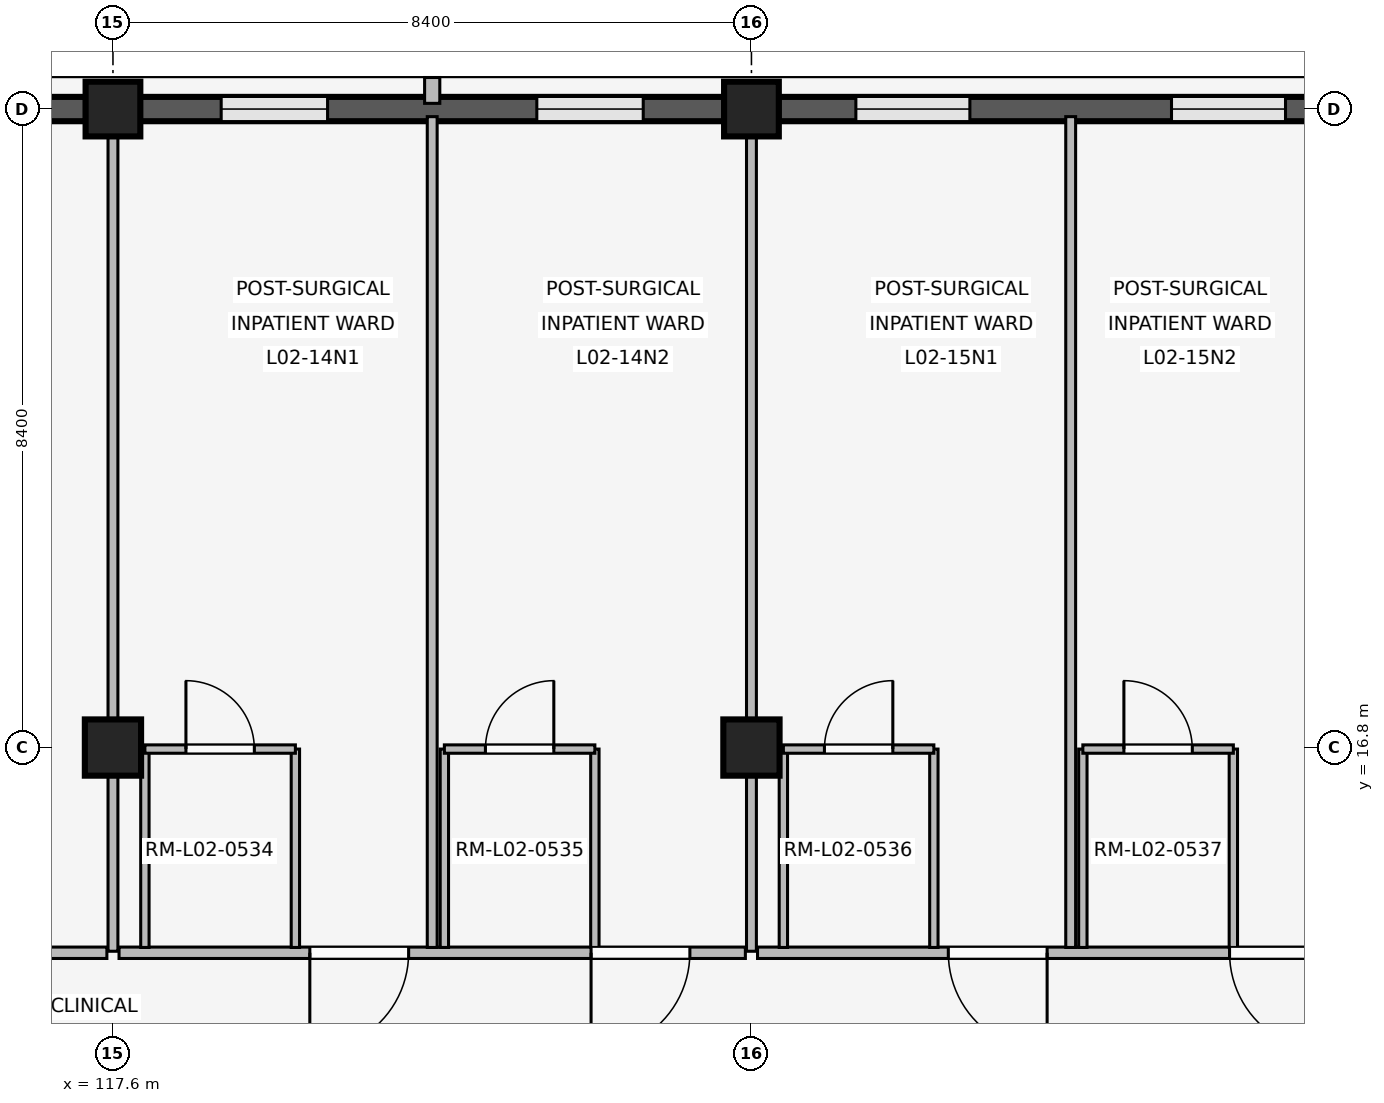
"""IFC4 building model, lengths in metres.
Left out: names, types, materials, properties, quantities, classifications, styles, units other than length and angle.
Written with IfcOpenShell. Run it as: python <this file> out.ifc"""

import sys

from ifc_helpers import new_model, si_unit, direction, frame, frame_2d, origin, origin_2d, place, context, subcontext, project, spatial, rectangle, extrude, element, fill, save


model = new_model("IFC4")
c1 = context("Model", 3, precision=1e-05, world=origin(), true_north=direction((0.0, 1.0)))
c2 = subcontext(c1, "Body", "Model", "MODEL_VIEW")
j1 = project(units=[si_unit("LENGTHUNIT", "METRE"), si_unit("PLANEANGLEUNIT", "RADIAN")], contexts=[c1])
p1 = place(None, origin())
s1 = spatial("IfcSite", under=j1, at=p1, CompositionType="ELEMENT")
p2 = place(p1, origin())
s2 = spatial("IfcBuilding", under=s1, at=p2, CompositionType="ELEMENT")
p3 = place(p2, frame((0.0, 0.0, 8.1)))
s3 = spatial("IfcBuildingStorey", under=s2, at=p3, CompositionType="ELEMENT", Elevation=8.1)
p4 = place(p3, frame((117.6, 16.8, 0.0), z_axis=(0.0, 0.0, 1.0), x_axis=(1.0, 0.0, 0.0)))
e1 = element("IfcColumn", 1, at=p4, inside=s3, PredefinedType="COLUMN", context=c2, shape_type="SweptSolid", body=[
    extrude(rectangle(XDim=0.74, YDim=0.74, at=origin_2d()), origin(), (0.0, 0.0, 1.0), 4.8),
])
p5 = place(p3, frame((117.6, 25.2, 0.0), z_axis=(0.0, 0.0, 1.0), x_axis=(1.0, 0.0, 0.0)))
e2 = element("IfcColumn", 2, at=p5, inside=s3, PredefinedType="COLUMN", context=c2, shape_type="SweptSolid", body=[
    extrude(rectangle(XDim=0.72, YDim=0.72, at=origin_2d()), origin(), (0.0, 0.0, 1.0), 4.8),
])
p6 = place(p3, frame((126.0, 16.8, 0.0), z_axis=(0.0, 0.0, 1.0), x_axis=(1.0, 0.0, 0.0)))
e3 = element("IfcColumn", 3, at=p6, inside=s3, PredefinedType="COLUMN", context=c2, shape_type="SweptSolid", body=[
    extrude(rectangle(XDim=0.74, YDim=0.74, at=origin_2d()), origin(), (0.0, 0.0, 1.0), 4.8),
])
p7 = place(p3, frame((126.0, 25.2, 0.0), z_axis=(0.0, 0.0, 1.0), x_axis=(1.0, 0.0, 0.0)))
e4 = element("IfcColumn", 4, at=p7, inside=s3, PredefinedType="COLUMN", context=c2, shape_type="SweptSolid", body=[
    extrude(rectangle(XDim=0.72, YDim=0.72, at=origin_2d()), origin(), (0.0, 0.0, 1.0), 4.8),
])
p8 = place(p3, frame((109.555, 25.2, 0.0), z_axis=(0.0, 0.0, 1.0), x_axis=(1.0, 0.0, 0.0)))
e5 = element("IfcWall", 5, at=p8, inside=s3, PredefinedType="SOLIDWALL", context=c2, shape_type="SweptSolid", body=[
    extrude(rectangle(XDim=7.69, YDim=0.32, at=frame_2d((3.845, 0.0))), origin(), (0.0, 0.0, 1.0), 3.86),
])
p9 = place(p8, frame((1.189, 0.0, 0.85)))
e6 = element("IfcOpeningElement", 6, at=p9, cuts=e5, PredefinedType="OPENING", context=c2, shape_type="SweptSolid", body=[
    extrude(rectangle(XDim=1.16, YDim=1.48, at=frame_2d((0.58, 0.74))), frame((0.0, 0.17, 0.0), z_axis=(0.0, -1.0, 0.0), x_axis=(1.0, 0.0, 0.0)), (0.0, 0.0, 1.0), 0.34),
])
p10 = place(p8, frame((5.341, 0.0, 0.85)))
e7 = element("IfcOpeningElement", 7, at=p10, cuts=e5, PredefinedType="OPENING", context=c2, shape_type="SweptSolid", body=[
    extrude(rectangle(XDim=1.16, YDim=1.48, at=frame_2d((0.58, 0.74))), frame((0.0, 0.17, 0.0), z_axis=(0.0, -1.0, 0.0), x_axis=(1.0, 0.0, 0.0)), (0.0, 0.0, 1.0), 0.34),
])
p11 = place(p3, frame((117.955, 25.2, 0.0), z_axis=(0.0, 0.0, 1.0), x_axis=(1.0, 0.0, 0.0)))
e8 = element("IfcWall", 8, at=p11, inside=s3, PredefinedType="SOLIDWALL", context=c2, shape_type="SweptSolid", body=[
    extrude(rectangle(XDim=7.69, YDim=0.32, at=frame_2d((3.845, 0.0))), origin(), (0.0, 0.0, 1.0), 3.86),
])
p12 = place(p11, frame((1.069, 0.0, 0.85)))
e9 = element("IfcOpeningElement", 9, at=p12, cuts=e8, PredefinedType="OPENING", context=c2, shape_type="SweptSolid", body=[
    extrude(rectangle(XDim=1.4, YDim=1.4, at=frame_2d((0.7, 0.7))), frame((0.0, 0.17, 0.0), z_axis=(0.0, -1.0, 0.0), x_axis=(1.0, 0.0, 0.0)), (0.0, 0.0, 1.0), 0.34),
])
p13 = place(p11, frame((5.221, 0.0, 0.85)))
e10 = element("IfcOpeningElement", 10, at=p13, cuts=e8, PredefinedType="OPENING", context=c2, shape_type="SweptSolid", body=[
    extrude(rectangle(XDim=1.4, YDim=1.4, at=frame_2d((0.7, 0.7))), frame((0.0, 0.17, 0.0), z_axis=(0.0, -1.0, 0.0), x_axis=(1.0, 0.0, 0.0)), (0.0, 0.0, 1.0), 0.34),
])
p14 = place(p3, frame((121.8, 25.275, 0.0), z_axis=(0.0, 0.0, 1.0), x_axis=(0.0, 1.0, 0.0)))
e11 = element("IfcWall", 11, at=p14, inside=s3, PredefinedType="ELEMENTEDWALL", context=c2, shape_type="SweptSolid", body=[
    extrude(rectangle(XDim=0.34, YDim=0.2, at=frame_2d((0.17, 0.0))), origin(), (0.0, 0.0, 1.0), 3.84),
])
p15 = place(p3, frame((126.355, 25.2, 0.0), z_axis=(0.0, 0.0, 1.0), x_axis=(1.0, 0.0, 0.0)))
e12 = element("IfcWall", 12, at=p15, inside=s3, PredefinedType="SOLIDWALL", context=c2, shape_type="SweptSolid", body=[
    extrude(rectangle(XDim=7.69, YDim=0.32, at=frame_2d((3.845, 0.0))), origin(), (0.0, 0.0, 1.0), 3.86),
])
p16 = place(p15, frame((1.019, 0.0, 0.85)))
e13 = element("IfcOpeningElement", 13, at=p16, cuts=e12, PredefinedType="OPENING", context=c2, shape_type="SweptSolid", body=[
    extrude(rectangle(XDim=1.5, YDim=1.55, at=frame_2d((0.75, 0.775))), frame((0.0, 0.17, 0.0), z_axis=(0.0, -1.0, 0.0), x_axis=(1.0, 0.0, 0.0)), (0.0, 0.0, 1.0), 0.34),
])
p17 = place(p15, frame((5.171, 0.0, 0.85)))
e14 = element("IfcOpeningElement", 14, at=p17, cuts=e12, PredefinedType="OPENING", context=c2, shape_type="SweptSolid", body=[
    extrude(rectangle(XDim=1.5, YDim=1.55, at=frame_2d((0.75, 0.775))), frame((0.0, 0.17, 0.0), z_axis=(0.0, -1.0, 0.0), x_axis=(1.0, 0.0, 0.0)), (0.0, 0.0, 1.0), 0.34),
])
p18 = place(p3, frame((117.52, 14.1, 0.0), z_axis=(0.0, 0.0, 1.0), x_axis=(-1.0, 0.0, 0.0)))
e15 = element("IfcWall", 15, at=p18, inside=s3, PredefinedType="PARTITIONING", context=c2, shape_type="SweptSolid", body=[
    extrude(rectangle(XDim=8.24, YDim=0.15, at=frame_2d((4.12, 0.0))), origin(), (0.0, 0.0, 1.0), 3.84),
])
p19 = place(p18, frame((3.37, 0.0, 0.0)))
e16 = element("IfcOpeningElement", 16, at=p19, cuts=e15, PredefinedType="OPENING", context=c2, shape_type="SweptSolid", body=[
    extrude(rectangle(XDim=1.5, YDim=2.3, at=frame_2d((0.75, 1.15))), frame((0.0, 0.085, 0.0), z_axis=(0.0, -1.0, 0.0), x_axis=(1.0, 0.0, 0.0)), (0.0, 0.0, 1.0), 0.17),
])
p20 = place(p3, frame((117.6, 14.12, 0.0), z_axis=(0.0, 0.0, 1.0), x_axis=(0.0, 1.0, 0.0)))
e17 = element("IfcWall", 17, at=p20, inside=s3, PredefinedType="PARTITIONING", context=c2, shape_type="SweptSolid", body=[
    extrude(rectangle(XDim=10.94, YDim=0.13, at=frame_2d((5.47, 0.0))), origin(), (0.0, 0.0, 1.0), 3.84),
])
p21 = place(p3, frame((125.92, 14.1, 0.0), z_axis=(0.0, 0.0, 1.0), x_axis=(-1.0, 0.0, 0.0)))
e18 = element("IfcWall", 18, at=p21, inside=s3, PredefinedType="PARTITIONING", context=c2, shape_type="SweptSolid", body=[
    extrude(rectangle(XDim=8.24, YDim=0.15, at=frame_2d((4.12, 0.0))), origin(), (0.0, 0.0, 1.0), 3.84),
])
p22 = place(p21, frame((0.73, 0.0, 0.0)))
e19 = element("IfcOpeningElement", 19, at=p22, cuts=e18, PredefinedType="OPENING", context=c2, shape_type="SweptSolid", body=[
    extrude(rectangle(XDim=1.3, YDim=2.25, at=frame_2d((0.65, 1.125))), frame((0.0, 0.085, 0.0), z_axis=(0.0, -1.0, 0.0), x_axis=(1.0, 0.0, 0.0)), (0.0, 0.0, 1.0), 0.17),
])
p23 = place(p21, frame((4.43, 0.0, 0.0)))
e20 = element("IfcOpeningElement", 20, at=p23, cuts=e18, PredefinedType="OPENING", context=c2, shape_type="SweptSolid", body=[
    extrude(rectangle(XDim=1.3, YDim=2.25, at=frame_2d((0.65, 1.125))), frame((0.0, 0.085, 0.0), z_axis=(0.0, -1.0, 0.0), x_axis=(1.0, 0.0, 0.0)), (0.0, 0.0, 1.0), 0.17),
])
p24 = place(p3, frame((121.8, 14.17, 0.0), z_axis=(0.0, 0.0, 1.0), x_axis=(0.0, 1.0, 0.0)))
e21 = element("IfcWall", 21, at=p24, inside=s3, PredefinedType="PARTITIONING", context=c2, shape_type="SweptSolid", body=[
    extrude(rectangle(XDim=10.93, YDim=0.13, at=frame_2d((5.465, 0.0))), origin(), (0.0, 0.0, 1.0), 3.84),
])
for number, where, z_axis, x_axis in (
    (22, (118.02, 14.17, 0.0), (0.0, 0.0, 1.0), (0.0, 1.0, 0.0)),
    (23, (120.0, 14.17, 0.0), (0.0, 0.0, 1.0), (0.0, 1.0, 0.0)),
):
    element("IfcWall", number, at=place(p3, frame(where, z_axis=z_axis, x_axis=x_axis)), inside=s3, PredefinedType="PARTITIONING", context=c2, shape_type="SweptSolid", body=[
        extrude(rectangle(XDim=2.61, YDim=0.11, at=frame_2d((1.305, 0.0))), origin(), (0.0, 0.0, 1.0), 3.84),
    ])
p25 = place(p3, frame((118.02, 16.78, 0.0), z_axis=(0.0, 0.0, 1.0), x_axis=(1.0, 0.0, 0.0)))
e24 = element("IfcWall", 24, at=p25, inside=s3, PredefinedType="PARTITIONING", context=c2, shape_type="SweptSolid", body=[
    extrude(rectangle(XDim=1.98, YDim=0.11, at=frame_2d((0.99, 0.0))), origin(), (0.0, 0.0, 1.0), 3.84),
])
p26 = place(p25, frame((0.54, 0.0, 0.0)))
e25 = element("IfcOpeningElement", 25, at=p26, cuts=e24, PredefinedType="OPENING", context=c2, shape_type="SweptSolid", body=[
    extrude(rectangle(XDim=0.9, YDim=2.1, at=frame_2d((0.45, 1.05))), frame((0.0, 0.065, 0.0), z_axis=(0.0, -1.0, 0.0), x_axis=(1.0, 0.0, 0.0)), (0.0, 0.0, 1.0), 0.13),
])
for number, where, z_axis, x_axis in (
    (26, (121.96, 14.17, 0.0), (0.0, 0.0, 1.0), (0.0, 1.0, 0.0)),
    (27, (123.94, 14.17, 0.0), (0.0, 0.0, 1.0), (0.0, 1.0, 0.0)),
):
    element("IfcWall", number, at=place(p3, frame(where, z_axis=z_axis, x_axis=x_axis)), inside=s3, PredefinedType="PARTITIONING", context=c2, shape_type="SweptSolid", body=[
        extrude(rectangle(XDim=2.61, YDim=0.11, at=frame_2d((1.305, 0.0))), origin(), (0.0, 0.0, 1.0), 3.84),
    ])
p27 = place(p3, frame((121.96, 16.78, 0.0), z_axis=(0.0, 0.0, 1.0), x_axis=(1.0, 0.0, 0.0)))
e28 = element("IfcWall", 28, at=p27, inside=s3, PredefinedType="PARTITIONING", context=c2, shape_type="SweptSolid", body=[
    extrude(rectangle(XDim=1.98, YDim=0.11, at=frame_2d((0.99, 0.0))), origin(), (0.0, 0.0, 1.0), 3.84),
])
p28 = place(p27, frame((0.54, 0.0, 0.0)))
e29 = element("IfcOpeningElement", 29, at=p28, cuts=e28, PredefinedType="OPENING", context=c2, shape_type="SweptSolid", body=[
    extrude(rectangle(XDim=0.9, YDim=2.1, at=frame_2d((0.45, 1.05))), frame((0.0, 0.065, 0.0), z_axis=(0.0, -1.0, 0.0), x_axis=(1.0, 0.0, 0.0)), (0.0, 0.0, 1.0), 0.13),
])
p29 = place(p3, frame((126.0, 14.12, 0.0), z_axis=(0.0, 0.0, 1.0), x_axis=(0.0, 1.0, 0.0)))
e30 = element("IfcWall", 30, at=p29, inside=s3, PredefinedType="PARTITIONING", context=c2, shape_type="SweptSolid", body=[
    extrude(rectangle(XDim=10.94, YDim=0.13, at=frame_2d((5.47, 0.0))), origin(), (0.0, 0.0, 1.0), 3.84),
])
p30 = place(p3, frame((134.26, 14.1, 0.0), z_axis=(0.0, 0.0, 1.0), x_axis=(-1.0, 0.0, 0.0)))
e31 = element("IfcWall", 31, at=p30, inside=s3, PredefinedType="PARTITIONING", context=c2, shape_type="SweptSolid", body=[
    extrude(rectangle(XDim=8.18, YDim=0.15, at=frame_2d((4.09, 0.0))), origin(), (0.0, 0.0, 1.0), 3.84),
])
p31 = place(p30, frame((0.67, 0.0, 0.0)))
e32 = element("IfcOpeningElement", 32, at=p31, cuts=e31, PredefinedType="OPENING", context=c2, shape_type="SweptSolid", body=[
    extrude(rectangle(XDim=1.3, YDim=2.25, at=frame_2d((0.65, 1.125))), frame((0.0, 0.085, 0.0), z_axis=(0.0, -1.0, 0.0), x_axis=(1.0, 0.0, 0.0)), (0.0, 0.0, 1.0), 0.17),
])
p32 = place(p30, frame((4.37, 0.0, 0.0)))
e33 = element("IfcOpeningElement", 33, at=p32, cuts=e31, PredefinedType="OPENING", context=c2, shape_type="SweptSolid", body=[
    extrude(rectangle(XDim=1.3, YDim=2.25, at=frame_2d((0.65, 1.125))), frame((0.0, 0.085, 0.0), z_axis=(0.0, -1.0, 0.0), x_axis=(1.0, 0.0, 0.0)), (0.0, 0.0, 1.0), 0.17),
])
p33 = place(p3, frame((130.2, 14.17, 0.0), z_axis=(0.0, 0.0, 1.0), x_axis=(0.0, 1.0, 0.0)))
e34 = element("IfcWall", 34, at=p33, inside=s3, PredefinedType="PARTITIONING", context=c2, shape_type="SweptSolid", body=[
    extrude(rectangle(XDim=10.93, YDim=0.13, at=frame_2d((5.465, 0.0))), origin(), (0.0, 0.0, 1.0), 3.84),
])
for number, where, z_axis, x_axis in (
    (35, (126.42, 14.17, 0.0), (0.0, 0.0, 1.0), (0.0, 1.0, 0.0)),
    (36, (128.4, 14.17, 0.0), (0.0, 0.0, 1.0), (0.0, 1.0, 0.0)),
):
    element("IfcWall", number, at=place(p3, frame(where, z_axis=z_axis, x_axis=x_axis)), inside=s3, PredefinedType="PARTITIONING", context=c2, shape_type="SweptSolid", body=[
        extrude(rectangle(XDim=2.61, YDim=0.11, at=frame_2d((1.305, 0.0))), origin(), (0.0, 0.0, 1.0), 3.84),
    ])
p34 = place(p3, frame((126.42, 16.78, 0.0), z_axis=(0.0, 0.0, 1.0), x_axis=(1.0, 0.0, 0.0)))
e37 = element("IfcWall", 37, at=p34, inside=s3, PredefinedType="PARTITIONING", context=c2, shape_type="SweptSolid", body=[
    extrude(rectangle(XDim=1.98, YDim=0.11, at=frame_2d((0.99, 0.0))), origin(), (0.0, 0.0, 1.0), 3.84),
])
p35 = place(p34, frame((0.54, 0.0, 0.0)))
e38 = element("IfcOpeningElement", 38, at=p35, cuts=e37, PredefinedType="OPENING", context=c2, shape_type="SweptSolid", body=[
    extrude(rectangle(XDim=0.9, YDim=2.1, at=frame_2d((0.45, 1.05))), frame((0.0, 0.065, 0.0), z_axis=(0.0, -1.0, 0.0), x_axis=(1.0, 0.0, 0.0)), (0.0, 0.0, 1.0), 0.13),
])
for number, where, z_axis, x_axis in (
    (39, (130.36, 14.17, 0.0), (0.0, 0.0, 1.0), (0.0, 1.0, 0.0)),
    (40, (132.34, 14.17, 0.0), (0.0, 0.0, 1.0), (0.0, 1.0, 0.0)),
):
    element("IfcWall", number, at=place(p3, frame(where, z_axis=z_axis, x_axis=x_axis)), inside=s3, PredefinedType="PARTITIONING", context=c2, shape_type="SweptSolid", body=[
        extrude(rectangle(XDim=2.61, YDim=0.11, at=frame_2d((1.305, 0.0))), origin(), (0.0, 0.0, 1.0), 3.84),
    ])
p36 = place(p3, frame((130.36, 16.78, 0.0), z_axis=(0.0, 0.0, 1.0), x_axis=(1.0, 0.0, 0.0)))
e41 = element("IfcWall", 41, at=p36, inside=s3, PredefinedType="PARTITIONING", context=c2, shape_type="SweptSolid", body=[
    extrude(rectangle(XDim=1.98, YDim=0.11, at=frame_2d((0.99, 0.0))), origin(), (0.0, 0.0, 1.0), 3.84),
])
p37 = place(p36, frame((0.54, 0.0, 0.0)))
e42 = element("IfcOpeningElement", 42, at=p37, cuts=e41, PredefinedType="OPENING", context=c2, shape_type="SweptSolid", body=[
    extrude(rectangle(XDim=0.9, YDim=2.1, at=frame_2d((0.45, 1.05))), frame((0.0, 0.065, 0.0), z_axis=(0.0, -1.0, 0.0), x_axis=(1.0, 0.0, 0.0)), (0.0, 0.0, 1.0), 0.13),
])
p38 = place(p12, origin())
e43 = element("IfcWindow", 43, at=p38, inside=s3, PartitioningType="SINGLE_PANEL", PredefinedType="WINDOW", context=c2, shape_type="SweptSolid", body=[
    extrude(rectangle(XDim=1.4, YDim=1.4, at=frame_2d((0.7, 0.7))), frame((0.0, 0.03, 0.0), z_axis=(0.0, -1.0, 0.0), x_axis=(1.0, 0.0, 0.0)), (0.0, 0.0, 1.0), 0.06),
])
fill(e9, e43)
p39 = place(p13, origin())
e44 = element("IfcWindow", 44, at=p39, inside=s3, PartitioningType="SINGLE_PANEL", PredefinedType="WINDOW", context=c2, shape_type="SweptSolid", body=[
    extrude(rectangle(XDim=1.4, YDim=1.4, at=frame_2d((0.7, 0.7))), frame((0.0, 0.03, 0.0), z_axis=(0.0, -1.0, 0.0), x_axis=(1.0, 0.0, 0.0)), (0.0, 0.0, 1.0), 0.06),
])
fill(e10, e44)
p40 = place(p16, origin())
e45 = element("IfcWindow", 45, at=p40, inside=s3, PartitioningType="SINGLE_PANEL", PredefinedType="WINDOW", context=c2, shape_type="SweptSolid", body=[
    extrude(rectangle(XDim=1.5, YDim=1.55, at=frame_2d((0.75, 0.775))), frame((0.0, 0.03, 0.0), z_axis=(0.0, -1.0, 0.0), x_axis=(1.0, 0.0, 0.0)), (0.0, 0.0, 1.0), 0.06),
])
fill(e13, e45)
p41 = place(p17, origin())
e46 = element("IfcWindow", 46, at=p41, inside=s3, PartitioningType="SINGLE_PANEL", PredefinedType="WINDOW", context=c2, shape_type="SweptSolid", body=[
    extrude(rectangle(XDim=1.5, YDim=1.55, at=frame_2d((0.75, 0.775))), frame((0.0, 0.03, 0.0), z_axis=(0.0, -1.0, 0.0), x_axis=(1.0, 0.0, 0.0)), (0.0, 0.0, 1.0), 0.06),
])
fill(e14, e46)
p42 = place(p22, origin())
e47 = element("IfcDoor", 47, at=p42, inside=s3, OperationType="SINGLE_SWING_RIGHT", PredefinedType="DOOR", context=c2, shape_type="SweptSolid", body=[
    extrude(rectangle(XDim=1.3, YDim=2.25, at=frame_2d((0.65, 1.125))), frame((0.0, 0.025, 0.0), z_axis=(0.0, -1.0, 0.0), x_axis=(1.0, 0.0, 0.0)), (0.0, 0.0, 1.0), 0.05),
])
fill(e19, e47)
p43 = place(p23, origin())
e48 = element("IfcDoor", 48, at=p43, inside=s3, OperationType="SINGLE_SWING_RIGHT", PredefinedType="DOOR", context=c2, shape_type="SweptSolid", body=[
    extrude(rectangle(XDim=1.3, YDim=2.25, at=frame_2d((0.65, 1.125))), frame((0.0, 0.025, 0.0), z_axis=(0.0, -1.0, 0.0), x_axis=(1.0, 0.0, 0.0)), (0.0, 0.0, 1.0), 0.05),
])
fill(e20, e48)
p44 = place(p26, origin())
e49 = element("IfcDoor", 49, at=p44, inside=s3, OperationType="SINGLE_SWING_LEFT", PredefinedType="DOOR", context=c2, shape_type="SweptSolid", body=[
    extrude(rectangle(XDim=0.9, YDim=2.1, at=frame_2d((0.45, 1.05))), frame((0.0, 0.025, 0.0), z_axis=(0.0, -1.0, 0.0), x_axis=(1.0, 0.0, 0.0)), (0.0, 0.0, 1.0), 0.05),
])
fill(e25, e49)
p45 = place(p28, origin())
e50 = element("IfcDoor", 50, at=p45, inside=s3, OperationType="SINGLE_SWING_RIGHT", PredefinedType="DOOR", context=c2, shape_type="SweptSolid", body=[
    extrude(rectangle(XDim=0.9, YDim=2.1, at=frame_2d((0.45, 1.05))), frame((0.0, 0.025, 0.0), z_axis=(0.0, -1.0, 0.0), x_axis=(1.0, 0.0, 0.0)), (0.0, 0.0, 1.0), 0.05),
])
fill(e29, e50)
p46 = place(p31, origin())
e51 = element("IfcDoor", 51, at=p46, inside=s3, OperationType="SINGLE_SWING_LEFT", PredefinedType="DOOR", context=c2, shape_type="SweptSolid", body=[
    extrude(rectangle(XDim=1.3, YDim=2.25, at=frame_2d((0.65, 1.125))), frame((0.0, 0.025, 0.0), z_axis=(0.0, -1.0, 0.0), x_axis=(1.0, 0.0, 0.0)), (0.0, 0.0, 1.0), 0.05),
])
fill(e32, e51)
p47 = place(p32, origin())
e52 = element("IfcDoor", 52, at=p47, inside=s3, OperationType="SINGLE_SWING_LEFT", PredefinedType="DOOR", context=c2, shape_type="SweptSolid", body=[
    extrude(rectangle(XDim=1.3, YDim=2.25, at=frame_2d((0.65, 1.125))), frame((0.0, 0.025, 0.0), z_axis=(0.0, -1.0, 0.0), x_axis=(1.0, 0.0, 0.0)), (0.0, 0.0, 1.0), 0.05),
])
fill(e33, e52)
p48 = place(p35, origin())
e53 = element("IfcDoor", 53, at=p48, inside=s3, OperationType="SINGLE_SWING_RIGHT", PredefinedType="DOOR", context=c2, shape_type="SweptSolid", body=[
    extrude(rectangle(XDim=0.9, YDim=2.1, at=frame_2d((0.45, 1.05))), frame((0.0, 0.025, 0.0), z_axis=(0.0, -1.0, 0.0), x_axis=(1.0, 0.0, 0.0)), (0.0, 0.0, 1.0), 0.05),
])
fill(e38, e53)
p49 = place(p37, origin())
e54 = element("IfcDoor", 54, at=p49, inside=s3, OperationType="SINGLE_SWING_LEFT", PredefinedType="DOOR", context=c2, shape_type="SweptSolid", body=[
    extrude(rectangle(XDim=0.9, YDim=2.1, at=frame_2d((0.45, 1.05))), frame((0.0, 0.025, 0.0), z_axis=(0.0, -1.0, 0.0), x_axis=(1.0, 0.0, 0.0)), (0.0, 0.0, 1.0), 0.05),
])
fill(e42, e54)
save(model, sys.argv[1])
